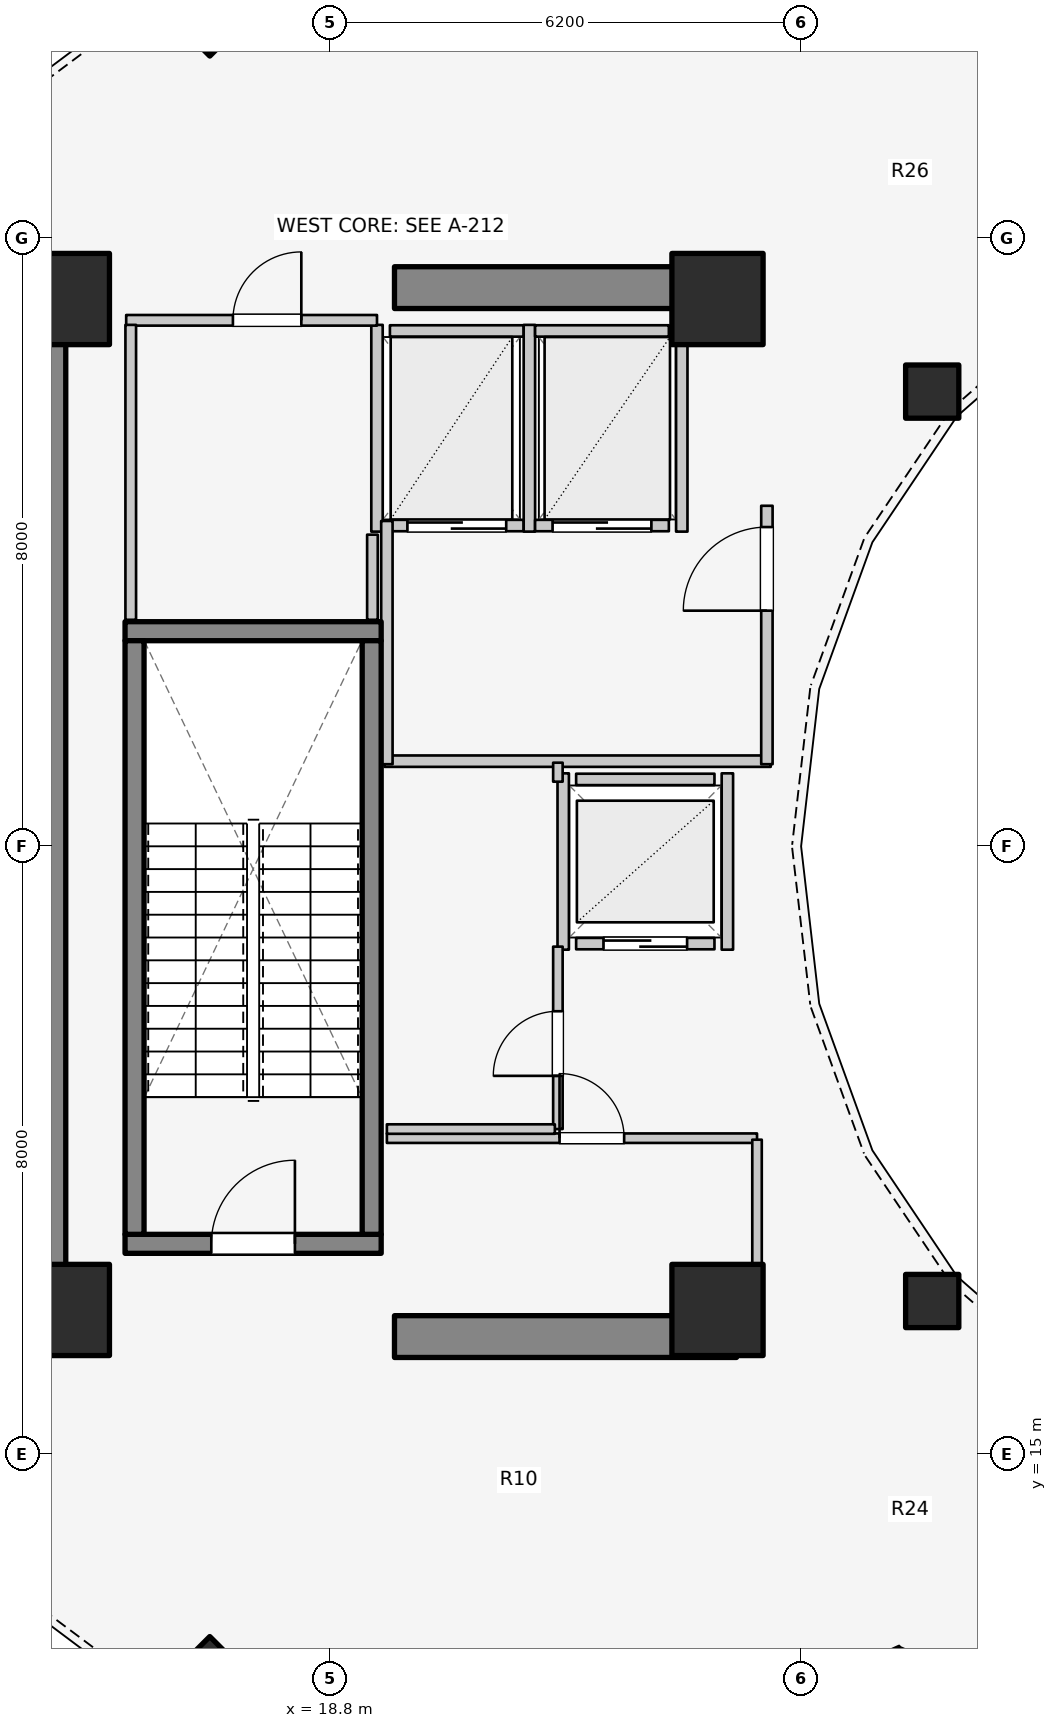
"""IFC4 building model, lengths in metres.
Left out: names, types, materials, properties, quantities, classifications, styles, units other than length and angle.
Written with IfcOpenShell. Run it as: python <this file> out.ifc"""

import sys

from ifc_helpers import new_model, si_unit, direction, frame, frame_2d, origin, origin_2d, place, context, subcontext, project, spatial, rectangle, extrude, element, fill, save


model = new_model("IFC4")
c1 = context("Model", 3, precision=1e-05, world=origin(), true_north=direction((0.0, 1.0)))
c2 = subcontext(c1, "Body", "Model", "MODEL_VIEW")
j1 = project(units=[si_unit("LENGTHUNIT", "METRE"), si_unit("PLANEANGLEUNIT", "RADIAN")], contexts=[c1])
p1 = place(None, origin())
s1 = spatial("IfcSite", under=j1, at=p1, CompositionType="ELEMENT")
p2 = place(p1, origin())
s2 = spatial("IfcBuilding", under=s1, at=p2, CompositionType="ELEMENT")
p3 = place(p2, frame((0.0, 0.0, 197.4)))
s3 = spatial("IfcBuildingStorey", under=s2, at=p3, CompositionType="ELEMENT", Elevation=197.4)
p4 = place(p3, frame((15.05, 17.05, 0.0), z_axis=(0.0, 0.0, 1.0), x_axis=(0.0, 1.0, 0.0)))
e1 = element("IfcWall", 1, at=p4, inside=s3, PredefinedType="SHEAR", context=c2, shape_type="SweptSolid", body=[
    extrude(rectangle(XDim=12.8, YDim=0.55, at=frame_2d((6.4, 0.0))), origin(), (0.0, 0.0, 1.0), 4.2),
])
for number, where, z_axis, x_axis in (
    (2, (19.65, 16.55, 0.0), (0.0, 0.0, 1.0), (1.0, 0.0, 0.0)),
    (3, (19.65, 30.35, 0.0), (0.0, 0.0, 1.0), (1.0, 0.0, 0.0)),
):
    element("IfcWall", number, at=place(p3, frame(where, z_axis=z_axis, x_axis=x_axis)), inside=s3, PredefinedType="SHEAR", context=c2, shape_type="SweptSolid", body=[
        extrude(rectangle(XDim=4.5, YDim=0.55, at=frame_2d((2.25, 0.0))), origin(), (0.0, 0.0, 1.0), 4.2),
    ])
p5 = place(p3, frame((16.105, 17.77, 0.0), z_axis=(0.0, 0.0, 1.0), x_axis=(1.0, 0.0, 0.0)))
e4 = element("IfcWall", 4, at=p5, inside=s3, PredefinedType="SOLIDWALL", context=c2, shape_type="SweptSolid", body=[
    extrude(rectangle(XDim=3.37, YDim=0.25, at=frame_2d((1.685, 0.0))), origin(), (0.0, 0.0, 1.0), 4.2),
])
p6 = place(p5, frame((1.135, 0.0, 0.0)))
e5 = element("IfcOpeningElement", 5, at=p6, cuts=e4, PredefinedType="OPENING", context=c2, shape_type="SweptSolid", body=[
    extrude(rectangle(XDim=1.1, YDim=2.1, at=frame_2d((0.55, 1.05))), frame((0.0, 0.135, 0.0), z_axis=(0.0, -1.0, 0.0), x_axis=(1.0, 0.0, 0.0)), (0.0, 0.0, 1.0), 0.27),
])
p7 = place(p3, frame((16.105, 25.83, 0.0), z_axis=(0.0, 0.0, 1.0), x_axis=(1.0, 0.0, 0.0)))
e6 = element("IfcWall", 6, at=p7, inside=s3, PredefinedType="SOLIDWALL", context=c2, shape_type="SweptSolid", body=[
    extrude(rectangle(XDim=3.37, YDim=0.25, at=frame_2d((1.685, 0.0))), origin(), (0.0, 0.0, 1.0), 4.2),
])
for number, where, z_axis, x_axis in (
    (7, (16.23, 17.895, 0.0), (0.0, 0.0, 1.0), (0.0, 1.0, 0.0)),
    (8, (19.35, 17.895, 0.0), (0.0, 0.0, 1.0), (0.0, 1.0, 0.0)),
):
    element("IfcWall", number, at=place(p3, frame(where, z_axis=z_axis, x_axis=x_axis)), inside=s3, PredefinedType="SOLIDWALL", context=c2, shape_type="SweptSolid", body=[
        extrude(rectangle(XDim=7.81, YDim=0.25, at=frame_2d((3.905, 0.0))), origin(), (0.0, 0.0, 1.0), 4.2),
    ])
for number, where, z_axis, x_axis in (
    (9, (15.3, 16.9, 0.0), (0.0, 0.0, 1.0), (1.0, 0.0, 0.0)),
    (10, (23.9, 16.9, 0.0), (0.0, 0.0, 1.0), (1.0, 0.0, 0.0)),
    (11, (23.9, 30.2, 0.0), (0.0, 0.0, 1.0), (1.0, 0.0, 0.0)),
    (12, (15.3, 30.2, 0.0), (0.0, 0.0, 1.0), (1.0, 0.0, 0.0)),
):
    element("IfcColumn", number, at=place(p3, frame(where, z_axis=z_axis, x_axis=x_axis)), inside=s3, PredefinedType="COLUMN", context=c2, shape_type="SweptSolid", body=[
        extrude(rectangle(XDim=1.2, YDim=1.2, at=origin_2d()), origin(), (0.0, 0.0, 1.0), 4.2),
    ])
p8 = place(p3, frame((26.725, 28.982, 0.0), z_axis=(0.0, 0.0, 1.0), x_axis=(1.0, 0.0, 0.0)))
e13 = element("IfcColumn", 13, at=p8, inside=s3, PredefinedType="COLUMN", context=c2, shape_type="SweptSolid", body=[
    extrude(rectangle(XDim=0.7, YDim=0.7, at=origin_2d()), origin(), (0.0, 0.0, 1.0), 4.2),
])
p9 = place(p3, frame((17.22, 33.962, 0.0), z_axis=(0.0, 0.0, 1.0), x_axis=(-0.707106781187, 0.707106781187, 0.0)))
e14 = element("IfcColumn", 14, at=p9, inside=s3, PredefinedType="COLUMN", context=c2, shape_type="SweptSolid", body=[
    extrude(rectangle(XDim=0.8, YDim=0.8, at=origin_2d()), origin(), (0.0, 0.0, 1.0), 4.2),
])
p10 = place(p3, frame((26.725, 17.018, 0.0), z_axis=(0.0, 0.0, 1.0), x_axis=(1.0, 0.0, 0.0)))
e15 = element("IfcColumn", 15, at=p10, inside=s3, PredefinedType="COLUMN", context=c2, shape_type="SweptSolid", body=[
    extrude(rectangle(XDim=0.7, YDim=0.7, at=origin_2d()), origin(), (0.0, 0.0, 1.0), 4.2),
])
p11 = place(p3, frame((17.22, 12.038, 0.0), z_axis=(0.0, 0.0, 1.0), x_axis=(-0.707106781187, -0.707106781187, 0.0)))
e16 = element("IfcColumn", 16, at=p11, inside=s3, PredefinedType="COLUMN", context=c2, shape_type="SweptSolid", body=[
    extrude(rectangle(XDim=0.8, YDim=0.8, at=origin_2d()), origin(), (0.0, 0.0, 1.0), 4.2),
])
p12 = place(p3, frame((22.04, 21.72, 0.0), z_axis=(0.0, 0.0, 1.0), x_axis=(1.0, 0.0, 0.0)))
e17 = element("IfcWall", 17, at=p12, inside=s3, PredefinedType="SOLIDWALL", context=c2, shape_type="SweptSolid", body=[
    extrude(rectangle(XDim=1.82, YDim=0.15, at=frame_2d((0.91, 0.0))), origin(), (0.0, 0.0, 1.0), 3.22),
])
p13 = place(p12, frame((0.36, 0.0, 0.0)))
e18 = element("IfcOpeningElement", 18, at=p13, cuts=e17, PredefinedType="OPENING", context=c2, shape_type="SweptSolid", body=[
    extrude(rectangle(XDim=1.1, YDim=2.1, at=frame_2d((0.55, 1.05))), frame((0.0, 0.085, 0.0), z_axis=(0.0, -1.0, 0.0), x_axis=(1.0, 0.0, 0.0)), (0.0, 0.0, 1.0), 0.17),
])
p14 = place(p3, frame((22.04, 23.88, 0.0), z_axis=(0.0, 0.0, 1.0), x_axis=(1.0, 0.0, 0.0)))
e19 = element("IfcWall", 19, at=p14, inside=s3, PredefinedType="SOLIDWALL", context=c2, shape_type="SweptSolid", body=[
    extrude(rectangle(XDim=1.82, YDim=0.15, at=frame_2d((0.91, 0.0))), origin(), (0.0, 0.0, 1.0), 3.22),
])
p15 = place(p3, frame((21.87, 21.64, 0.0), z_axis=(0.0, 0.0, 1.0), x_axis=(0.0, 1.0, 0.0)))
e20 = element("IfcWall", 20, at=p15, inside=s3, PredefinedType="SOLIDWALL", context=c2, shape_type="SweptSolid", body=[
    extrude(rectangle(XDim=2.32, YDim=0.15, at=frame_2d((1.16, 0.0))), origin(), (0.0, 0.0, 1.0), 3.675),
])
p16 = place(p3, frame((24.03, 21.64, 0.0), z_axis=(0.0, 0.0, 1.0), x_axis=(0.0, 1.0, 0.0)))
e21 = element("IfcWall", 21, at=p16, inside=s3, PredefinedType="SOLIDWALL", context=c2, shape_type="SweptSolid", body=[
    extrude(rectangle(XDim=2.32, YDim=0.15, at=frame_2d((1.16, 0.0))), origin(), (0.0, 0.0, 1.0), 3.22),
])
p17 = place(p3, frame((19.59, 27.22, 0.0), z_axis=(0.0, 0.0, 1.0), x_axis=(1.0, 0.0, 0.0)))
e22 = element("IfcWall", 22, at=p17, inside=s3, PredefinedType="SOLIDWALL", context=c2, shape_type="SweptSolid", body=[
    extrude(rectangle(XDim=1.76, YDim=0.15, at=frame_2d((0.88, 0.0))), origin(), (0.0, 0.0, 1.0), 3.675),
])
p18 = place(p17, frame((0.23, 0.0, 0.0)))
e23 = element("IfcOpeningElement", 23, at=p18, cuts=e22, PredefinedType="OPENING", context=c2, shape_type="SweptSolid", body=[
    extrude(rectangle(XDim=1.3, YDim=2.1, at=frame_2d((0.65, 1.05))), frame((0.0, 0.085, 0.0), z_axis=(0.0, -1.0, 0.0), x_axis=(1.0, 0.0, 0.0)), (0.0, 0.0, 1.0), 0.17),
])
p19 = place(p3, frame((19.59, 29.78, 0.0), z_axis=(0.0, 0.0, 1.0), x_axis=(1.0, 0.0, 0.0)))
e24 = element("IfcWall", 24, at=p19, inside=s3, PredefinedType="SOLIDWALL", context=c2, shape_type="SweptSolid", body=[
    extrude(rectangle(XDim=1.76, YDim=0.15, at=frame_2d((0.88, 0.0))), origin(), (0.0, 0.0, 1.0), 3.675),
])
for number, where, z_axis, x_axis in (
    (25, (19.42, 27.14, 0.0), (0.0, 0.0, 1.0), (0.0, 1.0, 0.0)),
    (26, (21.425, 27.14, 0.0), (0.0, 0.0, 1.0), (0.0, 1.0, 0.0)),
):
    element("IfcWall", number, at=place(p3, frame(where, z_axis=z_axis, x_axis=x_axis)), inside=s3, PredefinedType="SOLIDWALL", context=c2, shape_type="SweptSolid", body=[
        extrude(rectangle(XDim=2.72, YDim=0.15, at=frame_2d((1.36, 0.0))), origin(), (0.0, 0.0, 1.0), 3.675),
    ])
p20 = place(p3, frame((21.5, 27.22, 0.0), z_axis=(0.0, 0.0, 1.0), x_axis=(1.0, 0.0, 0.0)))
e27 = element("IfcWall", 27, at=p20, inside=s3, PredefinedType="SOLIDWALL", context=c2, shape_type="SweptSolid", body=[
    extrude(rectangle(XDim=1.76, YDim=0.15, at=frame_2d((0.88, 0.0))), origin(), (0.0, 0.0, 1.0), 3.675),
])
p21 = place(p20, frame((0.23, 0.0, 0.0)))
e28 = element("IfcOpeningElement", 28, at=p21, cuts=e27, PredefinedType="OPENING", context=c2, shape_type="SweptSolid", body=[
    extrude(rectangle(XDim=1.3, YDim=2.1, at=frame_2d((0.65, 1.05))), frame((0.0, 0.085, 0.0), z_axis=(0.0, -1.0, 0.0), x_axis=(1.0, 0.0, 0.0)), (0.0, 0.0, 1.0), 0.17),
])
p22 = place(p3, frame((21.5, 29.78, 0.0), z_axis=(0.0, 0.0, 1.0), x_axis=(1.0, 0.0, 0.0)))
e29 = element("IfcWall", 29, at=p22, inside=s3, PredefinedType="SOLIDWALL", context=c2, shape_type="SweptSolid", body=[
    extrude(rectangle(XDim=1.76, YDim=0.15, at=frame_2d((0.88, 0.0))), origin(), (0.0, 0.0, 1.0), 3.675),
])
p23 = place(p3, frame((23.43, 27.14, 0.0), z_axis=(0.0, 0.0, 1.0), x_axis=(0.0, 1.0, 0.0)))
e30 = element("IfcWall", 30, at=p23, inside=s3, PredefinedType="SOLIDWALL", context=c2, shape_type="SweptSolid", body=[
    extrude(rectangle(XDim=2.72, YDim=0.15, at=frame_2d((1.36, 0.0))), origin(), (0.0, 0.0, 1.0), 3.675),
])
p24 = place(p3, frame((19.52, 24.12, 0.0), z_axis=(0.0, 0.0, 1.0), x_axis=(1.0, 0.0, 0.0)))
e31 = element("IfcWall", 31, at=p24, inside=s3, PredefinedType="PARTITIONING", context=c2, shape_type="SweptSolid", body=[
    extrude(rectangle(XDim=5.08, YDim=0.15, at=frame_2d((2.54, 0.0))), origin(), (0.0, 0.0, 1.0), 3.22),
])
p25 = place(p3, frame((19.55, 24.08, 0.0), z_axis=(0.0, 0.0, 1.0), x_axis=(0.0, 1.0, 0.0)))
e32 = element("IfcWall", 32, at=p25, inside=s3, PredefinedType="PARTITIONING", context=c2, shape_type="SweptSolid", body=[
    extrude(rectangle(XDim=3.2, YDim=0.15, at=frame_2d((1.6, 0.0))), origin(), (0.0, 0.0, 1.0), 3.675),
])
p26 = place(p3, frame((24.55, 24.08, 0.0), z_axis=(0.0, 0.0, 1.0), x_axis=(0.0, 1.0, 0.0)))
e33 = element("IfcWall", 33, at=p26, inside=s3, PredefinedType="PARTITIONING", context=c2, shape_type="SweptSolid", body=[
    extrude(rectangle(XDim=3.4, YDim=0.15, at=frame_2d((1.7, 0.0))), origin(), (0.0, 0.0, 1.0), 3.675),
])
p27 = place(p26, frame((2.02, 0.0, 0.0)))
e34 = element("IfcOpeningElement", 34, at=p27, cuts=e33, PredefinedType="OPENING", context=c2, shape_type="SweptSolid", body=[
    extrude(rectangle(XDim=1.1, YDim=2.1, at=frame_2d((0.55, 1.05))), frame((0.0, 0.085, 0.0), z_axis=(0.0, -1.0, 0.0), x_axis=(1.0, 0.0, 0.0)), (0.0, 0.0, 1.0), 0.17),
])
p28 = place(p3, frame((19.55, 19.16, 0.0), z_axis=(0.0, 0.0, 1.0), x_axis=(1.0, 0.0, 0.0)))
e35 = element("IfcWall", 35, at=p28, inside=s3, PredefinedType="PARTITIONING", context=c2, shape_type="SweptSolid", body=[
    extrude(rectangle(XDim=4.87, YDim=0.125, at=frame_2d((2.435, 0.0))), origin(), (0.0, 0.0, 1.0), 3.22),
])
p29 = place(p28, frame((2.272, 0.0, 0.0)))
e36 = element("IfcOpeningElement", 36, at=p29, cuts=e35, PredefinedType="OPENING", context=c2, shape_type="SweptSolid", body=[
    extrude(rectangle(XDim=0.85, YDim=2.05, at=frame_2d((0.425, 1.025))), frame((0.0, 0.073, 0.0), z_axis=(0.0, -1.0, 0.0), x_axis=(1.0, 0.0, 0.0)), (0.0, 0.0, 1.0), 0.145),
])
p30 = place(p3, frame((24.42, 17.1, 0.0), z_axis=(0.0, 0.0, 1.0), x_axis=(0.0, 1.0, 0.0)))
e37 = element("IfcWall", 37, at=p30, inside=s3, PredefinedType="PARTITIONING", context=c2, shape_type="SweptSolid", body=[
    extrude(rectangle(XDim=2.04, YDim=0.125, at=frame_2d((1.02, 0.0))), origin(), (0.0, 0.0, 1.0), 3.052),
])
p31 = place(p3, frame((21.8, 19.28, 0.0), z_axis=(0.0, 0.0, 1.0), x_axis=(0.0, 1.0, 0.0)))
e38 = element("IfcWall", 38, at=p31, inside=s3, PredefinedType="PARTITIONING", context=c2, shape_type="SweptSolid", body=[
    extrude(rectangle(XDim=2.4, YDim=0.125, at=frame_2d((1.2, 0.0))), origin(), (0.0, 0.0, 1.0), 3.675),
])
p32 = place(p31, frame((0.7, 0.0, 0.0)))
e39 = element("IfcOpeningElement", 39, at=p32, cuts=e38, PredefinedType="OPENING", context=c2, shape_type="SweptSolid", body=[
    extrude(rectangle(XDim=0.85, YDim=2.05, at=frame_2d((0.425, 1.025))), frame((0.0, 0.073, 0.0), z_axis=(0.0, -1.0, 0.0), x_axis=(1.0, 0.0, 0.0)), (0.0, 0.0, 1.0), 0.145),
])
p33 = place(p3, frame((21.8, 23.85, 0.0), z_axis=(0.0, 0.0, 1.0), x_axis=(0.0, 1.0, 0.0)))
e40 = element("IfcWall", 40, at=p33, inside=s3, PredefinedType="PARTITIONING", context=c2, shape_type="SweptSolid", body=[
    extrude(rectangle(XDim=0.25, YDim=0.125, at=frame_2d((0.125, 0.0))), origin(), (0.0, 0.0, 1.0), 3.675),
])
p34 = place(p3, frame((19.55, 19.28, 0.0), z_axis=(0.0, 0.0, 1.0), x_axis=(1.0, 0.0, 0.0)))
e41 = element("IfcWall", 41, at=p34, inside=s3, PredefinedType="PARTITIONING", context=c2, shape_type="SweptSolid", body=[
    extrude(rectangle(XDim=2.21, YDim=0.125, at=frame_2d((1.105, 0.0))), origin(), (0.0, 0.0, 1.0), 3.22),
])
p35 = place(p3, frame((26.321, 12.412, 0.0), z_axis=(0.0, 0.0, 1.0), x_axis=(-0.912031098102, -0.410121050538, 0.0)))
e42 = element("IfcWall", 42, at=p35, inside=s3, PredefinedType="PARTITIONING", context=c2, shape_type="SweptSolid", body=[
    extrude(rectangle(XDim=6.125, YDim=0.15, at=frame_2d((3.063, 0.0))), origin(), (0.0, 0.0, 1.0), 2.32),
])
p36 = place(p3, frame((26.268, 12.396, 0.0), z_axis=(0.0, 0.0, 1.0), x_axis=(0.914156698007, -0.405360989106, 0.0)))
e43 = element("IfcWall", 43, at=p36, inside=s3, PredefinedType="PARTITIONING", context=c2, shape_type="SweptSolid", body=[
    extrude(rectangle(XDim=3.031, YDim=0.15, at=frame_2d((1.515, 0.0))), origin(), (0.0, 0.0, 1.0), 2.32),
])
p37 = place(p3, frame((16.12, 29.92, 0.0), z_axis=(0.0, 0.0, 1.0), x_axis=(1.0, 0.0, 0.0)))
e44 = element("IfcWall", 44, at=p37, inside=s3, PredefinedType="PLUMBINGWALL", context=c2, shape_type="SweptSolid", body=[
    extrude(rectangle(XDim=3.3, YDim=0.14, at=frame_2d((1.65, 0.0))), origin(), (0.0, 0.0, 1.0), 3.675),
])
p38 = place(p37, frame((1.404, 0.0, 0.0)))
e45 = element("IfcOpeningElement", 45, at=p38, cuts=e44, PredefinedType="OPENING", context=c2, shape_type="SweptSolid", body=[
    extrude(rectangle(XDim=0.9, YDim=2.1, at=frame_2d((0.45, 1.05))), frame((0.0, 0.08, 0.0), z_axis=(0.0, -1.0, 0.0), x_axis=(1.0, 0.0, 0.0)), (0.0, 0.0, 1.0), 0.16),
])
p39 = place(p3, frame((16.18, 25.98, 0.0), z_axis=(0.0, 0.0, 1.0), x_axis=(0.0, 1.0, 0.0)))
e46 = element("IfcWall", 46, at=p39, inside=s3, PredefinedType="PLUMBINGWALL", context=c2, shape_type="SweptSolid", body=[
    extrude(rectangle(XDim=3.88, YDim=0.14, at=frame_2d((1.94, 0.0))), origin(), (0.0, 0.0, 1.0), 3.675),
])
p40 = place(p3, frame((19.36, 25.98, 0.0), z_axis=(0.0, 0.0, 1.0), x_axis=(0.0, 1.0, 0.0)))
e47 = element("IfcWall", 47, at=p40, inside=s3, PredefinedType="PLUMBINGWALL", context=c2, shape_type="SweptSolid", body=[
    extrude(rectangle(XDim=1.12, YDim=0.14, at=frame_2d((0.56, 0.0))), origin(), (0.0, 0.0, 1.0), 3.675),
])
p41 = place(p6, origin())
e48 = element("IfcDoor", 48, at=p41, inside=s3, OperationType="SINGLE_SWING_RIGHT", PredefinedType="DOOR", context=c2, shape_type="SweptSolid", body=[
    extrude(rectangle(XDim=1.1, YDim=2.1, at=frame_2d((0.55, 1.05))), frame((0.0, 0.025, 0.0), z_axis=(0.0, -1.0, 0.0), x_axis=(1.0, 0.0, 0.0)), (0.0, 0.0, 1.0), 0.05),
])
fill(e5, e48)
p42 = place(p13, origin())
e49 = element("IfcDoor", 49, at=p42, inside=s3, OperationType="DOUBLE_DOOR_SLIDING", PredefinedType="DOOR", context=c2, shape_type="SweptSolid", body=[
    extrude(rectangle(XDim=1.1, YDim=2.1, at=frame_2d((0.55, 1.05))), frame((0.0, 0.025, 0.0), z_axis=(0.0, -1.0, 0.0), x_axis=(1.0, 0.0, 0.0)), (0.0, 0.0, 1.0), 0.05),
])
fill(e18, e49)
p43 = place(p18, origin())
e50 = element("IfcDoor", 50, at=p43, inside=s3, OperationType="DOUBLE_DOOR_SLIDING", PredefinedType="DOOR", context=c2, shape_type="SweptSolid", body=[
    extrude(rectangle(XDim=1.3, YDim=2.1, at=frame_2d((0.65, 1.05))), frame((0.0, 0.025, 0.0), z_axis=(0.0, -1.0, 0.0), x_axis=(1.0, 0.0, 0.0)), (0.0, 0.0, 1.0), 0.05),
])
fill(e23, e50)
p44 = place(p21, origin())
e51 = element("IfcDoor", 51, at=p44, inside=s3, OperationType="DOUBLE_DOOR_SLIDING", PredefinedType="DOOR", context=c2, shape_type="SweptSolid", body=[
    extrude(rectangle(XDim=1.3, YDim=2.1, at=frame_2d((0.65, 1.05))), frame((0.0, 0.025, 0.0), z_axis=(0.0, -1.0, 0.0), x_axis=(1.0, 0.0, 0.0)), (0.0, 0.0, 1.0), 0.05),
])
fill(e28, e51)
p45 = place(p27, origin())
e52 = element("IfcDoor", 52, at=p45, inside=s3, OperationType="SINGLE_SWING_LEFT", PredefinedType="DOOR", context=c2, shape_type="SweptSolid", body=[
    extrude(rectangle(XDim=1.1, YDim=2.1, at=frame_2d((0.55, 1.05))), frame((0.0, 0.025, 0.0), z_axis=(0.0, -1.0, 0.0), x_axis=(1.0, 0.0, 0.0)), (0.0, 0.0, 1.0), 0.05),
])
fill(e34, e52)
p46 = place(p29, origin())
e53 = element("IfcDoor", 53, at=p46, inside=s3, OperationType="SINGLE_SWING_LEFT", PredefinedType="DOOR", context=c2, shape_type="SweptSolid", body=[
    extrude(rectangle(XDim=0.85, YDim=2.05, at=frame_2d((0.425, 1.025))), frame((0.0, 0.025, 0.0), z_axis=(0.0, -1.0, 0.0), x_axis=(1.0, 0.0, 0.0)), (0.0, 0.0, 1.0), 0.05),
])
fill(e36, e53)
p47 = place(p32, origin())
e54 = element("IfcDoor", 54, at=p47, inside=s3, OperationType="SINGLE_SWING_LEFT", PredefinedType="DOOR", context=c2, shape_type="SweptSolid", body=[
    extrude(rectangle(XDim=0.85, YDim=2.05, at=frame_2d((0.425, 1.025))), frame((0.0, 0.025, 0.0), z_axis=(0.0, -1.0, 0.0), x_axis=(1.0, 0.0, 0.0)), (0.0, 0.0, 1.0), 0.05),
])
fill(e39, e54)
p48 = place(p38, origin())
e55 = element("IfcDoor", 55, at=p48, inside=s3, OperationType="SINGLE_SWING_RIGHT", PredefinedType="DOOR", context=c2, shape_type="SweptSolid", body=[
    extrude(rectangle(XDim=0.9, YDim=2.1, at=frame_2d((0.45, 1.05))), frame((0.0, 0.025, 0.0), z_axis=(0.0, -1.0, 0.0), x_axis=(1.0, 0.0, 0.0)), (0.0, 0.0, 1.0), 0.05),
])
fill(e45, e55)
save(model, sys.argv[1])
